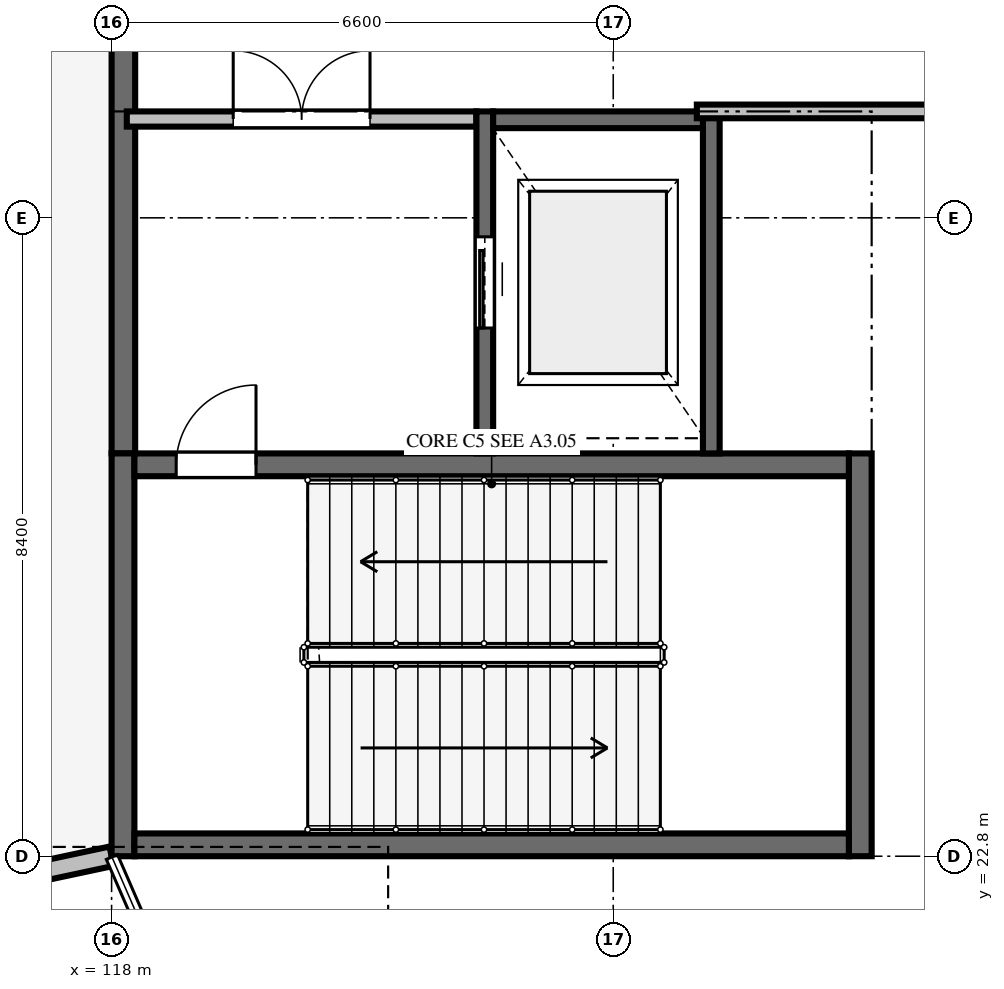
"""IFC4 building model, lengths in metres.
Left out: names, types, materials, properties, quantities, classifications, styles, units other than length and angle.
Written with IfcOpenShell. Run it as: python <this file> out.ifc"""

import sys

from ifc_helpers import new_model, si_unit, direction, frame, frame_2d, origin, place, context, subcontext, project, spatial, polyline, rectangle, outline, extrude, element, fill, save


model = new_model("IFC4")
c1 = context("Model", 3, precision=1e-05, world=origin(), true_north=direction((0.0, 1.0)))
c2 = subcontext(c1, "Body", "Model", "MODEL_VIEW")
j1 = project(units=[si_unit("LENGTHUNIT", "METRE"), si_unit("PLANEANGLEUNIT", "RADIAN")], contexts=[c1])
p1 = place(None, origin())
s1 = spatial("IfcSite", under=j1, at=p1, CompositionType="ELEMENT")
p2 = place(p1, origin())
s2 = spatial("IfcBuilding", under=s1, at=p2, CompositionType="ELEMENT")
p3 = place(p2, frame((0.0, 0.0, 10.8)))
s3 = spatial("IfcBuildingStorey", under=s2, at=p3, CompositionType="ELEMENT", Elevation=10.8)
p4 = place(p3, frame((105.8, 20.2, 0.0), z_axis=(0.0, 0.0, 1.0), x_axis=(0.97803466984, 0.208442281199, 0.0)))
e1 = element("IfcWall", 1, at=p4, inside=s3, PredefinedType="SOLIDWALL", context=c2, shape_type="SweptSolid", body=[
    extrude(outline(polyline([(0.0, 0.0), (12.474, 0.0), (12.47, 0.02), (0.0, 1.82), (0.0, 0.0)])), frame((0.0, 0.13, 0.0), z_axis=(0.0, -1.0, 0.0), x_axis=(1.0, 0.0, 0.0)), (0.0, 0.0, 1.0), 0.26),
])
p5 = place(p3, frame((118.155, 28.1, 0.0), z_axis=(0.0, 0.0, 1.0), x_axis=(0.0, 1.0, 0.0)))
e2 = element("IfcWall", 2, at=p5, inside=s3, PredefinedType="SOLIDWALL", context=c2, shape_type="SweptSolid", body=[
    extrude(rectangle(XDim=5.92, YDim=0.31, at=frame_2d((2.96, 0.0))), origin(), (0.0, 0.0, 1.0), 5.68),
])
for number, where, z_axis, x_axis in (
    (3, (118.15, 22.8, 0.0), (0.0, 0.0, 1.0), (0.0, 1.0, 0.0)),
    (4, (127.85, 28.1, 0.0), (0.0, 0.0, 1.0), (0.0, -1.0, 0.0)),
):
    element("IfcWall", number, at=place(p3, frame(where, z_axis=z_axis, x_axis=x_axis)), inside=s3, PredefinedType="SHEAR", context=c2, shape_type="SweptSolid", body=[
        extrude(rectangle(XDim=5.3, YDim=0.3, at=frame_2d((2.65, 0.0))), origin(), (0.0, 0.0, 1.0), 5.68),
    ])
p6 = place(p3, frame((127.7, 22.95, 0.0), z_axis=(0.0, 0.0, 1.0), x_axis=(-1.0, 0.0, 0.0)))
e5 = element("IfcWall", 5, at=p6, inside=s3, PredefinedType="SHEAR", context=c2, shape_type="SweptSolid", body=[
    extrude(rectangle(XDim=9.4, YDim=0.3, at=frame_2d((4.7, 0.0))), origin(), (0.0, 0.0, 1.0), 5.68),
])
p7 = place(p3, frame((118.3, 27.95, 0.0), z_axis=(0.0, 0.0, 1.0), x_axis=(1.0, 0.0, 0.0)))
e6 = element("IfcWall", 6, at=p7, inside=s3, PredefinedType="SHEAR", context=c2, shape_type="SweptSolid", body=[
    extrude(rectangle(XDim=9.4, YDim=0.3, at=frame_2d((4.7, 0.0))), origin(), (0.0, 0.0, 1.0), 5.68),
])
p8 = place(p7, frame((0.55, 0.0, 0.0)))
e7 = element("IfcOpeningElement", 7, at=p8, cuts=e6, PredefinedType="OPENING", context=c2, shape_type="SweptSolid", body=[
    extrude(rectangle(XDim=1.05, YDim=2.2, at=frame_2d((0.525, 1.1))), frame((0.0, 0.16, 0.0), z_axis=(0.0, -1.0, 0.0), x_axis=(1.0, 0.0, 0.0)), (0.0, 0.0, 1.0), 0.32),
])
p9 = place(p3, frame((118.2, 32.5, 0.0), z_axis=(0.0, 0.0, 1.0), x_axis=(1.0, 0.0, 0.0)))
e8 = element("IfcWall", 8, at=p9, inside=s3, PredefinedType="SOLIDWALL", context=c2, shape_type="SweptSolid", body=[
    extrude(rectangle(XDim=4.6, YDim=0.2, at=frame_2d((2.3, 0.0))), origin(), (0.0, 0.0, 1.0), 5.082),
])
p10 = place(p9, frame((1.4, 0.0, 0.0)))
e9 = element("IfcOpeningElement", 9, at=p10, cuts=e8, PredefinedType="OPENING", context=c2, shape_type="SweptSolid", body=[
    extrude(rectangle(XDim=1.8, YDim=2.2, at=frame_2d((0.9, 1.1))), frame((0.0, 0.11, 0.0), z_axis=(0.0, -1.0, 0.0), x_axis=(1.0, 0.0, 0.0)), (0.0, 0.0, 1.0), 0.22),
])
p11 = place(p3, frame((122.91, 28.1, 0.0), z_axis=(0.0, 0.0, 1.0), x_axis=(0.0, 1.0, 0.0)))
e10 = element("IfcWall", 10, at=p11, inside=s3, PredefinedType="SOLIDWALL", context=c2, shape_type="SweptSolid", body=[
    extrude(rectangle(XDim=4.5, YDim=0.22, at=frame_2d((2.25, 0.0))), origin(), (0.0, 0.0, 1.0), 5.68),
])
p12 = place(p11, frame((1.65, 0.0, 0.0)))
e11 = element("IfcOpeningElement", 11, at=p12, cuts=e10, PredefinedType="OPENING", context=c2, shape_type="SweptSolid", body=[
    extrude(rectangle(XDim=1.2, YDim=2.2, at=frame_2d((0.6, 1.1))), frame((0.0, 0.12, 0.0), z_axis=(0.0, -1.0, 0.0), x_axis=(1.0, 0.0, 0.0)), (0.0, 0.0, 1.0), 0.24),
])
p13 = place(p3, frame((125.89, 28.1, 0.0), z_axis=(0.0, 0.0, 1.0), x_axis=(0.0, 1.0, 0.0)))
e12 = element("IfcWall", 12, at=p13, inside=s3, PredefinedType="SOLIDWALL", context=c2, shape_type="SweptSolid", body=[
    extrude(rectangle(XDim=4.5, YDim=0.22, at=frame_2d((2.25, 0.0))), origin(), (0.0, 0.0, 1.0), 5.68),
])
p14 = place(p3, frame((123.02, 32.49, 0.0), z_axis=(0.0, 0.0, 1.0), x_axis=(1.0, 0.0, 0.0)))
e13 = element("IfcWall", 13, at=p14, inside=s3, PredefinedType="SOLIDWALL", context=c2, shape_type="SweptSolid", body=[
    extrude(rectangle(XDim=2.76, YDim=0.22, at=frame_2d((1.38, 0.0))), origin(), (0.0, 0.0, 1.0), 5.68),
])
p15 = place(p3, frame((129.28, 32.6, 0.0), z_axis=(0.0, 0.0, 1.0), x_axis=(-1.0, 0.0, 0.0)))
e14 = element("IfcWall", 14, at=p15, inside=s3, PredefinedType="PARTITIONING", context=c2, shape_type="SweptSolid", body=[
    extrude(rectangle(XDim=3.58, YDim=0.18, at=frame_2d((1.79, 0.0))), origin(), (0.0, 0.0, 1.0), 5.65),
])
p16 = place(p8, origin())
e15 = element("IfcDoor", 15, at=p16, inside=s3, OperationType="SINGLE_SWING_RIGHT", PredefinedType="DOOR", context=c2, shape_type="SweptSolid", body=[
    extrude(rectangle(XDim=1.05, YDim=2.2, at=frame_2d((0.525, 1.1))), frame((0.0, 0.025, 0.0), z_axis=(0.0, -1.0, 0.0), x_axis=(1.0, 0.0, 0.0)), (0.0, 0.0, 1.0), 0.05),
])
fill(e7, e15)
p17 = place(p10, origin())
e16 = element("IfcDoor", 16, at=p17, inside=s3, OperationType="DOUBLE_DOOR_SINGLE_SWING", PredefinedType="DOOR", context=c2, shape_type="SweptSolid", body=[
    extrude(rectangle(XDim=1.8, YDim=2.2, at=frame_2d((0.9, 1.1))), frame((0.0, 0.025, 0.0), z_axis=(0.0, -1.0, 0.0), x_axis=(1.0, 0.0, 0.0)), (0.0, 0.0, 1.0), 0.05),
])
fill(e9, e16)
p18 = place(p12, origin())
e17 = element("IfcDoor", 17, at=p18, inside=s3, OperationType="SLIDING_TO_LEFT", PredefinedType="DOOR", context=c2, shape_type="SweptSolid", body=[
    extrude(rectangle(XDim=1.2, YDim=2.2, at=frame_2d((0.6, 1.1))), frame((0.0, 0.025, 0.0), z_axis=(0.0, -1.0, 0.0), x_axis=(1.0, 0.0, 0.0)), (0.0, 0.0, 1.0), 0.05),
])
fill(e11, e17)
save(model, sys.argv[1])
